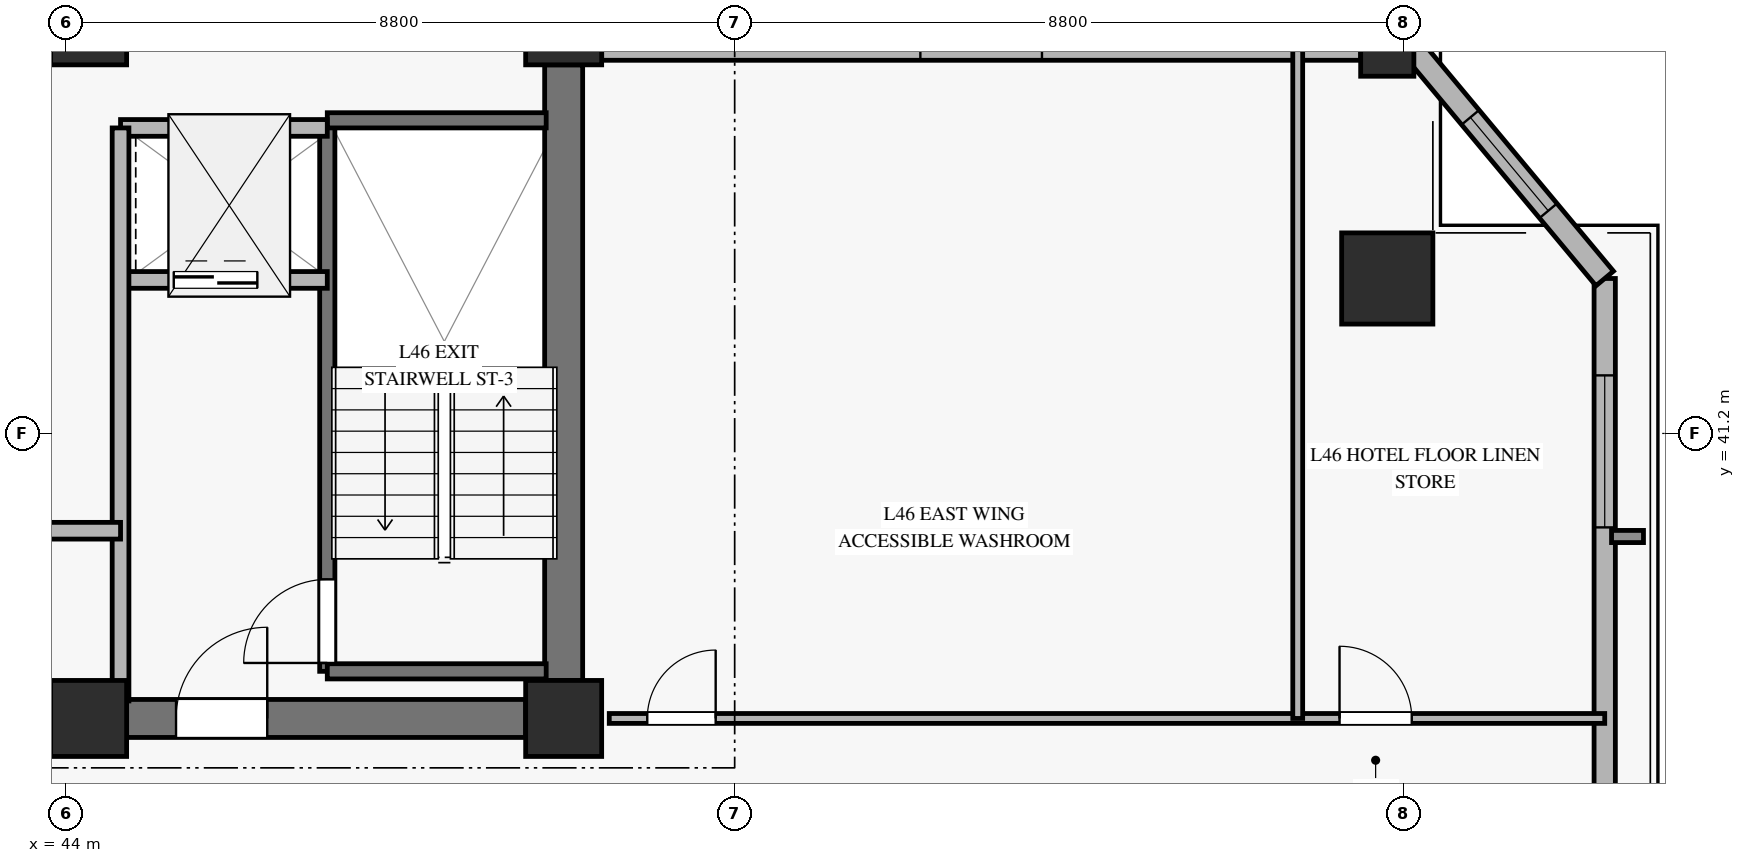
"""IFC4 building model, lengths in metres.
Left out: names, types, materials, properties, quantities, classifications, styles, units other than length and angle.
Written with IfcOpenShell. Run it as: python <this file> out.ifc"""

import sys

from ifc_helpers import new_model, si_unit, direction, frame, frame_2d, origin, origin_2d, place, context, subcontext, project, spatial, rectangle, hollow_rectangle, extrude, source, transform, mapped, element, fill, save


model = new_model("IFC4")
c1 = context("Model", 3, precision=1e-05, world=origin(), true_north=direction((0.0, 1.0)))
c2 = subcontext(c1, "Body", "Model", "MODEL_VIEW")
j1 = project(units=[si_unit("LENGTHUNIT", "METRE"), si_unit("PLANEANGLEUNIT", "RADIAN")], contexts=[c1])
p1 = place(None, origin())
s1 = spatial("IfcSite", under=j1, at=p1, CompositionType="ELEMENT")
p2 = place(p1, origin())
s2 = spatial("IfcBuilding", under=s1, at=p2, CompositionType="ELEMENT")
p3 = place(p2, frame((0.0, 0.0, 184.2)))
s3 = spatial("IfcBuildingStorey", under=s2, at=p3, CompositionType="ELEMENT", Elevation=184.2)
m1 = source(origin(), c2, "Body", "SweptSolid", [
    extrude(rectangle(XDim=1.0, YDim=1.0, at=origin_2d()), origin(), (0.0, 0.0, 1.0), 3.27),
])
for number, where, z_axis, x_axis in (
    (1, (44.3, 37.45, 0.0), (0.0, 0.0, 1.0), (1.0, 0.0, 0.0)),
    (2, (44.3, 46.55, 0.0), (0.0, 0.0, 1.0), (1.0, 0.0, 0.0)),
    (3, (50.55, 37.45, 0.0), (0.0, 0.0, 1.0), (1.0, 0.0, 0.0)),
    (4, (50.55, 46.55, 0.0), (0.0, 0.0, 1.0), (1.0, 0.0, 0.0)),
):
    element("IfcColumn", number, at=place(p3, frame(where, z_axis=z_axis, x_axis=x_axis)), inside=s3, PredefinedType="PILASTER", context=c2, shape_type="MappedRepresentation", body=[
        mapped(m1, transform((0.0, 0.0, 0.0), x_axis=(1.0, 0.0, 0.0), y_axis=(0.0, 1.0, 0.0), z_axis=(0.0, 0.0, 1.0), scale=1.0)),
    ])
p4 = place(p3, frame((44.8, 37.45, 0.0), z_axis=(0.0, 0.0, 1.0), x_axis=(1.0, 0.0, 0.0)))
e5 = element("IfcWall", 5, at=p4, inside=s3, PredefinedType="SHEAR", context=c2, shape_type="SweptSolid", body=[
    extrude(rectangle(XDim=5.25, YDim=0.5, at=frame_2d((2.625, 0.0))), origin(), (0.0, 0.0, 1.0), 3.27),
])
p5 = place(p4, frame((0.65, 0.0, 0.0)))
e6 = element("IfcOpeningElement", 6, at=p5, cuts=e5, PredefinedType="OPENING", context=c2, shape_type="SweptSolid", body=[
    extrude(rectangle(XDim=1.2, YDim=2.15, at=frame_2d((0.6, 1.075))), frame((0.0, 0.26, 0.0), z_axis=(0.0, -1.0, 0.0), x_axis=(1.0, 0.0, 0.0)), (0.0, 0.0, 1.0), 0.52),
])
p6 = place(p3, frame((50.55, 37.95, 0.0), z_axis=(0.0, 0.0, 1.0), x_axis=(0.0, 1.0, 0.0)))
e7 = element("IfcWall", 7, at=p6, inside=s3, PredefinedType="SHEAR", context=c2, shape_type="SweptSolid", body=[
    extrude(rectangle(XDim=8.1, YDim=0.5, at=frame_2d((4.05, 0.0))), origin(), (0.0, 0.0, 1.0), 3.27),
])
m2 = source(origin(), c2, "Body", "SweptSolid", [
    extrude(hollow_rectangle(XDim=1.2, YDim=1.2, WallThickness=0.055, at=origin_2d()), origin(), (0.0, 0.0, 1.0), 3.27),
])
p7 = place(p3, frame((61.386, 43.239, 0.0), z_axis=(0.0, 0.0, 1.0), x_axis=(1.0, 0.0, 0.0)))
e8 = element("IfcColumn", 8, at=p7, inside=s3, PredefinedType="COLUMN", context=c2, shape_type="MappedRepresentation", body=[
    mapped(m2, transform((0.0, 0.0, 0.0), x_axis=(1.0, 0.0, 0.0), y_axis=(0.0, 1.0, 0.0), z_axis=(0.0, 0.0, 1.0), scale=1.0)),
])
m3 = source(origin(), c2, "Body", "SweptSolid", [
    extrude(hollow_rectangle(XDim=0.7, YDim=0.7, WallThickness=0.032, at=origin_2d()), origin(), (0.0, 0.0, 1.0), 3.27),
])
p8 = place(p3, frame((61.386, 46.25, 0.0), z_axis=(0.0, 0.0, 1.0), x_axis=(1.0, 0.0, 0.0)))
e9 = element("IfcColumn", 9, at=p8, inside=s3, PredefinedType="COLUMN", context=c2, shape_type="MappedRepresentation", body=[
    mapped(m3, transform((0.0, 0.0, 0.0), x_axis=(1.0, 0.0, 0.0), y_axis=(0.0, 1.0, 0.0), z_axis=(0.0, 0.0, 1.0), scale=1.0)),
])
p9 = place(p3, frame((64.247, 28.477, 0.0), z_axis=(0.0, 0.0, 1.0), x_axis=(0.0, 1.0, 0.0)))
e10 = element("IfcWall", 10, at=p9, inside=s3, PredefinedType="SOLIDWALL", context=c2, shape_type="SweptSolid", body=[
    extrude(rectangle(XDim=14.762, YDim=0.28, at=frame_2d((7.381, 0.0))), origin(), (0.0, 0.0, 1.0), 2.75),
])
p10 = place(p9, frame((1.232, 0.0, 0.45)))
e11 = element("IfcOpeningElement", 11, at=p10, cuts=e10, PredefinedType="OPENING", context=c2, shape_type="SweptSolid", body=[
    extrude(rectangle(XDim=2.0, YDim=2.0, at=frame_2d((1.0, 1.0))), frame((0.0, 0.15, 0.0), z_axis=(0.0, -1.0, 0.0), x_axis=(1.0, 0.0, 0.0)), (0.0, 0.0, 1.0), 0.3),
])
p11 = place(p9, frame((11.487, 0.0, 0.45)))
e12 = element("IfcOpeningElement", 12, at=p11, cuts=e10, PredefinedType="OPENING", context=c2, shape_type="SweptSolid", body=[
    extrude(rectangle(XDim=2.0, YDim=2.0, at=frame_2d((1.0, 1.0))), frame((0.0, 0.15, 0.0), z_axis=(0.0, -1.0, 0.0), x_axis=(1.0, 0.0, 0.0)), (0.0, 0.0, 1.0), 0.3),
])
p12 = place(p3, frame((51.05, 46.25, 0.0), z_axis=(0.0, 0.0, 1.0), x_axis=(1.0, 0.0, 0.0)))
e13 = element("IfcWall", 13, at=p12, inside=s3, PredefinedType="SOLIDWALL", context=c2, shape_type="SweptSolid", body=[
    extrude(rectangle(XDim=9.986, YDim=0.28, at=frame_2d((4.993, 0.0))), origin(), (0.0, 0.0, 1.0), 2.75),
])
p13 = place(p12, frame((4.193, 0.0, 0.45)))
e14 = element("IfcOpeningElement", 14, at=p13, cuts=e13, PredefinedType="OPENING", context=c2, shape_type="SweptSolid", body=[
    extrude(rectangle(XDim=1.6, YDim=2.0, at=frame_2d((0.8, 1.0))), frame((0.0, 0.15, 0.0), z_axis=(0.0, -1.0, 0.0), x_axis=(1.0, 0.0, 0.0)), (0.0, 0.0, 1.0), 0.3),
])
p14 = place(p3, frame((64.247, 43.239, 0.0), z_axis=(0.0, 0.0, 1.0), x_axis=(-0.640459985381, 0.767991541051, 0.0)))
e15 = element("IfcWall", 15, at=p14, inside=s3, PredefinedType="SOLIDWALL", context=c2, shape_type="SweptSolid", body=[
    extrude(rectangle(XDim=3.921, YDim=0.3, at=frame_2d((1.96, 0.0))), origin(), (0.0, 0.0, 1.0), 2.75),
])
p15 = place(p14, frame((1.16, 0.0, 0.45)))
e16 = element("IfcOpeningElement", 16, at=p15, cuts=e15, PredefinedType="OPENING", context=c2, shape_type="SweptSolid", body=[
    extrude(rectangle(XDim=1.6, YDim=2.0, at=frame_2d((0.8, 1.0))), frame((0.0, 0.16, 0.0), z_axis=(0.0, -1.0, 0.0), x_axis=(1.0, 0.0, 0.0)), (0.0, 0.0, 1.0), 0.32),
])
p16 = place(p3, frame((47.44, 38.07, 0.0), z_axis=(0.0, 0.0, 1.0), x_axis=(0.0, 1.0, 0.0)))
e17 = element("IfcWall", 17, at=p16, inside=s3, PredefinedType="SOLIDWALL", context=c2, shape_type="SweptSolid", body=[
    extrude(rectangle(XDim=7.25, YDim=0.2, at=frame_2d((3.625, 0.0))), origin(), (0.0, 0.0, 1.0), 3.5),
])
p17 = place(p16, frame((0.11, 0.0, 0.0)))
e18 = element("IfcOpeningElement", 18, at=p17, cuts=e17, PredefinedType="OPENING", context=c2, shape_type="SweptSolid", body=[
    extrude(rectangle(XDim=1.1, YDim=2.15, at=frame_2d((0.55, 1.075))), frame((0.0, 0.11, 0.0), z_axis=(0.0, -1.0, 0.0), x_axis=(1.0, 0.0, 0.0)), (0.0, 0.0, 1.0), 0.22),
])
for number, where, z_axis, x_axis in (
    (19, (47.44, 45.32, 0.0), (0.0, 0.0, 1.0), (1.0, 0.0, 0.0)),
    (20, (47.44, 38.07, 0.0), (0.0, 0.0, 1.0), (1.0, 0.0, 0.0)),
):
    element("IfcWall", number, at=place(p3, frame(where, z_axis=z_axis, x_axis=x_axis)), inside=s3, PredefinedType="SOLIDWALL", context=c2, shape_type="SweptSolid", body=[
        extrude(rectangle(XDim=2.88, YDim=0.2, at=frame_2d((1.44, 0.0))), origin(), (0.0, 0.0, 1.0), 3.5),
    ])
p18 = place(p3, frame((44.72, 43.22, 0.0), z_axis=(0.0, 0.0, 1.0), x_axis=(1.0, 0.0, 0.0)))
e21 = element("IfcWall", 21, at=p18, inside=s3, PredefinedType="SOLIDWALL", context=c2, shape_type="SweptSolid", body=[
    extrude(rectangle(XDim=2.72, YDim=0.22, at=frame_2d((1.36, 0.0))), origin(), (0.0, 0.0, 1.0), 3.27),
])
p19 = place(p18, frame((0.7, 0.0, 0.0)))
e22 = element("IfcOpeningElement", 22, at=p19, cuts=e21, PredefinedType="OPENING", context=c2, shape_type="SweptSolid", body=[
    extrude(rectangle(XDim=1.1, YDim=2.2, at=frame_2d((0.55, 1.1))), frame((0.0, 0.12, 0.0), z_axis=(0.0, -1.0, 0.0), x_axis=(1.0, 0.0, 0.0)), (0.0, 0.0, 1.0), 0.24),
])
p20 = place(p3, frame((44.72, 45.22, 0.0), z_axis=(0.0, 0.0, 1.0), x_axis=(1.0, 0.0, 0.0)))
e23 = element("IfcWall", 23, at=p20, inside=s3, PredefinedType="SOLIDWALL", context=c2, shape_type="SweptSolid", body=[
    extrude(rectangle(XDim=2.72, YDim=0.22, at=frame_2d((1.36, 0.0))), origin(), (0.0, 0.0, 1.0), 3.27),
])
p21 = place(p3, frame((44.72, 37.68, 0.0), z_axis=(0.0, 0.0, 1.0), x_axis=(0.0, 1.0, 0.0)))
e24 = element("IfcWall", 24, at=p21, inside=s3, PredefinedType="SOLIDWALL", context=c2, shape_type="SweptSolid", body=[
    extrude(rectangle(XDim=7.54, YDim=0.22, at=frame_2d((3.77, 0.0))), origin(), (0.0, 0.0, 1.0), 3.27),
])
p22 = place(p3, frame((36.12, 39.92, 0.0), z_axis=(0.0, 0.0, 1.0), x_axis=(1.0, 0.0, 0.0)))
e25 = element("IfcWall", 25, at=p22, inside=s3, PredefinedType="SOLIDWALL", context=c2, shape_type="SweptSolid", body=[
    extrude(rectangle(XDim=8.6, YDim=0.22, at=frame_2d((4.3, 0.0))), origin(), (0.0, 0.0, 1.0), 2.555),
])
p23 = place(p3, frame((51.15, 37.45, 0.0), z_axis=(0.0, 0.0, 1.0), x_axis=(1.0, 0.0, 0.0)))
e26 = element("IfcWall", 26, at=p23, inside=s3, PredefinedType="PARTITIONING", context=c2, shape_type="SweptSolid", body=[
    extrude(rectangle(XDim=13.097, YDim=0.13, at=frame_2d((6.549, 0.0))), origin(), (0.0, 0.0, 1.0), 2.755),
])
p24 = place(p23, frame((0.5, 0.0, 0.0)))
e27 = element("IfcOpeningElement", 27, at=p24, cuts=e26, PredefinedType="OPENING", context=c2, shape_type="SweptSolid", body=[
    extrude(rectangle(XDim=0.9, YDim=2.1, at=frame_2d((0.45, 1.05))), frame((0.0, 0.075, 0.0), z_axis=(0.0, -1.0, 0.0), x_axis=(1.0, 0.0, 0.0)), (0.0, 0.0, 1.0), 0.15),
])
p25 = place(p23, frame((9.608, 0.0, 0.0)))
e28 = element("IfcOpeningElement", 28, at=p25, cuts=e26, PredefinedType="OPENING", context=c2, shape_type="SweptSolid", body=[
    extrude(rectangle(XDim=0.95, YDim=2.1, at=frame_2d((0.475, 1.05))), frame((0.0, 0.075, 0.0), z_axis=(0.0, -1.0, 0.0), x_axis=(1.0, 0.0, 0.0)), (0.0, 0.0, 1.0), 0.15),
])
p26 = place(p3, frame((60.208, 37.45, 0.0), z_axis=(0.0, 0.0, 1.0), x_axis=(0.0, 1.0, 0.0)))
e29 = element("IfcWall", 29, at=p26, inside=s3, PredefinedType="PARTITIONING", context=c2, shape_type="SweptSolid", body=[
    extrude(rectangle(XDim=8.8, YDim=0.13, at=frame_2d((4.4, 0.0))), origin(), (0.0, 0.0, 1.0), 3.27),
])
m4 = source(origin(), c2, "Body", "SweptSolid", [
    extrude(rectangle(XDim=2.0, YDim=2.0, at=frame_2d((1.0, 1.0))), frame((0.0, 0.03, 0.0), z_axis=(0.0, -1.0, 0.0), x_axis=(1.0, 0.0, 0.0)), (0.0, 0.0, 1.0), 0.06),
])
p27 = place(p11, origin())
e30 = element("IfcWindow", 30, at=p27, inside=s3, PartitioningType="SINGLE_PANEL", PredefinedType="WINDOW", context=c2, shape_type="MappedRepresentation", body=[
    mapped(m4, transform((0.0, 0.0, 0.0), x_axis=(1.0, 0.0, 0.0), y_axis=(0.0, 1.0, 0.0), z_axis=(0.0, 0.0, 1.0), scale=1.0)),
])
fill(e12, e30)
m5 = source(origin(), c2, "Body", "SweptSolid", [
    extrude(rectangle(XDim=1.6, YDim=2.0, at=frame_2d((0.8, 1.0))), frame((0.0, 0.03, 0.0), z_axis=(0.0, -1.0, 0.0), x_axis=(1.0, 0.0, 0.0)), (0.0, 0.0, 1.0), 0.06),
])
p28 = place(p15, origin())
e31 = element("IfcWindow", 31, at=p28, inside=s3, PartitioningType="SINGLE_PANEL", PredefinedType="WINDOW", context=c2, shape_type="MappedRepresentation", body=[
    mapped(m5, transform((0.0, 0.0, 0.0), x_axis=(1.0, 0.0, 0.0), y_axis=(0.0, 1.0, 0.0), z_axis=(0.0, 0.0, 1.0), scale=1.0)),
])
fill(e16, e31)
m6 = source(origin(), c2, "Body", "SweptSolid", [
    extrude(rectangle(XDim=1.1, YDim=2.15, at=frame_2d((0.55, 1.075))), frame((0.0, 0.025, 0.0), z_axis=(0.0, -1.0, 0.0), x_axis=(1.0, 0.0, 0.0)), (0.0, 0.0, 1.0), 0.05),
])
p29 = place(p17, origin())
e32 = element("IfcDoor", 32, at=p29, inside=s3, OperationType="SINGLE_SWING_LEFT", PredefinedType="DOOR", context=c2, shape_type="MappedRepresentation", body=[
    mapped(m6, transform((0.0, 0.0, 0.0), x_axis=(1.0, 0.0, 0.0), y_axis=(0.0, 1.0, 0.0), z_axis=(0.0, 0.0, 1.0), scale=1.0)),
])
fill(e18, e32)
m7 = source(origin(), c2, "Body", "SweptSolid", [
    extrude(rectangle(XDim=1.1, YDim=2.2, at=frame_2d((0.55, 1.1))), frame((0.0, 0.025, 0.0), z_axis=(0.0, -1.0, 0.0), x_axis=(1.0, 0.0, 0.0)), (0.0, 0.0, 1.0), 0.05),
])
p30 = place(p19, origin())
e33 = element("IfcDoor", 33, at=p30, inside=s3, OperationType="SLIDING_TO_LEFT", PredefinedType="DOOR", context=c2, shape_type="MappedRepresentation", body=[
    mapped(m7, transform((0.0, 0.0, 0.0), x_axis=(1.0, 0.0, 0.0), y_axis=(0.0, 1.0, 0.0), z_axis=(0.0, 0.0, 1.0), scale=1.0)),
])
fill(e22, e33)
m8 = source(origin(), c2, "Body", "SweptSolid", [
    extrude(rectangle(XDim=1.2, YDim=2.15, at=frame_2d((0.6, 1.075))), frame((0.0, 0.025, 0.0), z_axis=(0.0, -1.0, 0.0), x_axis=(1.0, 0.0, 0.0)), (0.0, 0.0, 1.0), 0.05),
])
p31 = place(p5, origin())
e34 = element("IfcDoor", 34, at=p31, inside=s3, OperationType="SINGLE_SWING_RIGHT", PredefinedType="DOOR", context=c2, shape_type="MappedRepresentation", body=[
    mapped(m8, transform((0.0, 0.0, 0.0), x_axis=(1.0, 0.0, 0.0), y_axis=(0.0, 1.0, 0.0), z_axis=(0.0, 0.0, 1.0), scale=1.0)),
])
fill(e6, e34)
m9 = source(origin(), c2, "Body", "SweptSolid", [
    extrude(rectangle(XDim=0.9, YDim=2.1, at=frame_2d((0.45, 1.05))), frame((0.0, 0.025, 0.0), z_axis=(0.0, -1.0, 0.0), x_axis=(1.0, 0.0, 0.0)), (0.0, 0.0, 1.0), 0.05),
])
p32 = place(p24, origin())
e35 = element("IfcDoor", 35, at=p32, inside=s3, OperationType="SINGLE_SWING_RIGHT", PredefinedType="DOOR", context=c2, shape_type="MappedRepresentation", body=[
    mapped(m9, transform((0.0, 0.0, 0.0), x_axis=(1.0, 0.0, 0.0), y_axis=(0.0, 1.0, 0.0), z_axis=(0.0, 0.0, 1.0), scale=1.0)),
])
fill(e27, e35)
m10 = source(origin(), c2, "Body", "SweptSolid", [
    extrude(rectangle(XDim=0.95, YDim=2.1, at=frame_2d((0.475, 1.05))), frame((0.0, 0.025, 0.0), z_axis=(0.0, -1.0, 0.0), x_axis=(1.0, 0.0, 0.0)), (0.0, 0.0, 1.0), 0.05),
])
p33 = place(p25, origin())
e36 = element("IfcDoor", 36, at=p33, inside=s3, OperationType="SINGLE_SWING_LEFT", PredefinedType="DOOR", context=c2, shape_type="MappedRepresentation", body=[
    mapped(m10, transform((0.0, 0.0, 0.0), x_axis=(1.0, 0.0, 0.0), y_axis=(0.0, 1.0, 0.0), z_axis=(0.0, 0.0, 1.0), scale=1.0)),
])
fill(e28, e36)
save(model, sys.argv[1])
